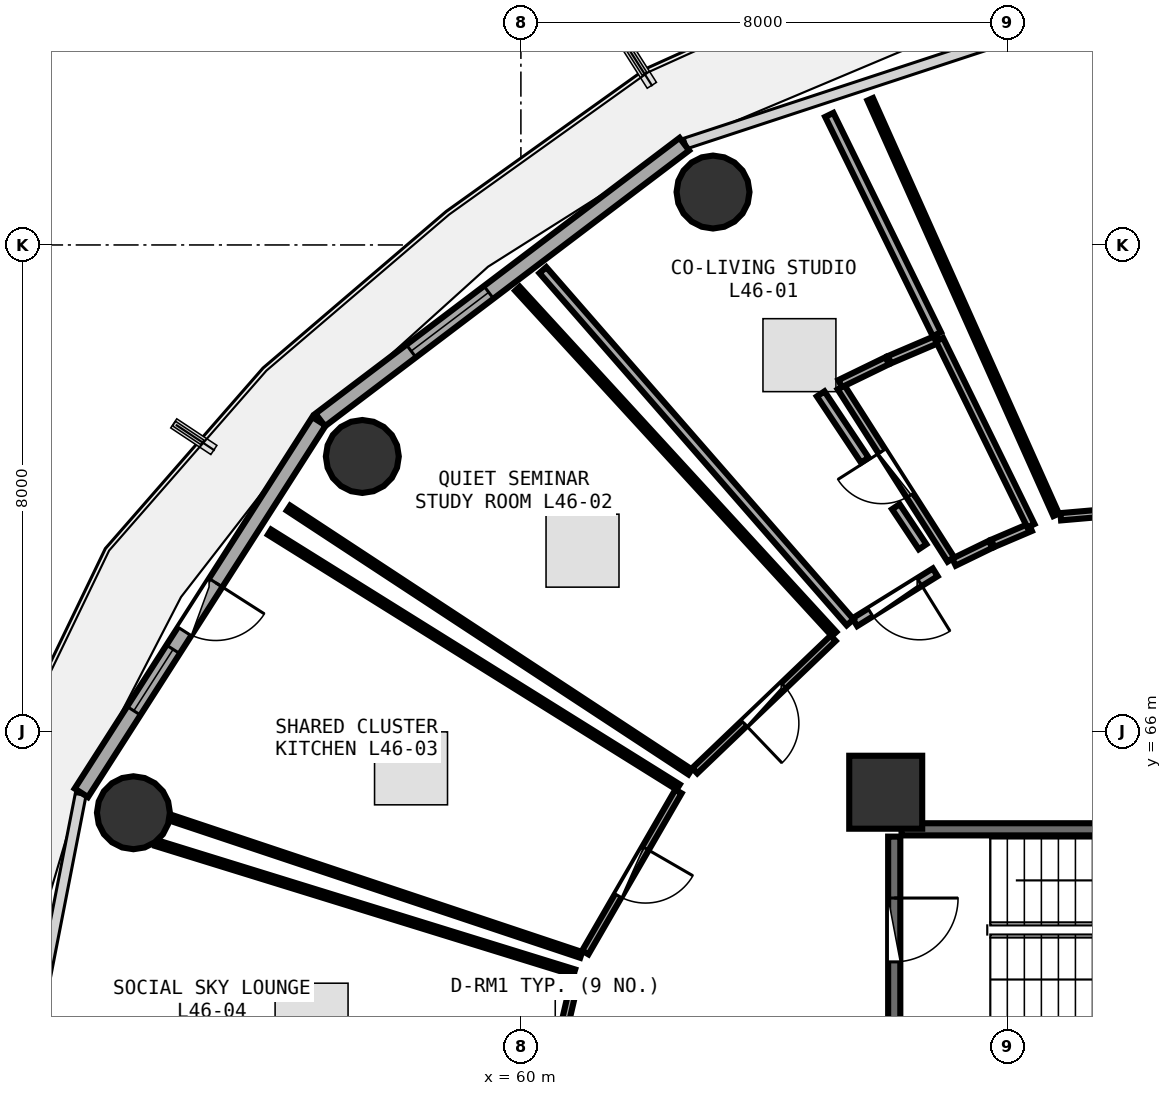
"""IFC4 building model, lengths in metres.
Left out: names, types, materials, properties, quantities, classifications, styles, units other than length and angle.
Written with IfcOpenShell. Run it as: python <this file> out.ifc"""

import sys

from ifc_helpers import new_model, si_unit, direction, frame, frame_2d, origin, origin_2d, place, context, subcontext, project, spatial, rectangle, circle, extrude, element, fill, save


model = new_model("IFC4")
c1 = context("Model", 3, precision=1e-05, world=origin(), true_north=direction((0.0, 1.0)))
c2 = subcontext(c1, "Body", "Model", "MODEL_VIEW")
j1 = project(units=[si_unit("LENGTHUNIT", "METRE"), si_unit("PLANEANGLEUNIT", "RADIAN")], contexts=[c1])
p1 = place(None, origin())
s1 = spatial("IfcSite", under=j1, at=p1, CompositionType="ELEMENT")
p2 = place(p1, origin())
s2 = spatial("IfcBuilding", under=s1, at=p2, CompositionType="ELEMENT")
p3 = place(p2, frame((0.0, 0.0, 180.6)))
s3 = spatial("IfcBuildingStorey", under=s2, at=p3, CompositionType="ELEMENT", Elevation=180.6)
p4 = place(p3, frame((66.0, 65.0, 0.0), z_axis=(0.0, 0.0, 1.0), x_axis=(1.0, 0.0, 0.0)))
e1 = element("IfcColumn", 1, at=p4, inside=s3, PredefinedType="PILASTER", context=c2, shape_type="SweptSolid", body=[
    extrude(rectangle(XDim=1.2, YDim=1.2, at=origin_2d()), origin(), (0.0, 0.0, 1.0), 3.75),
])
for number, where, z_axis, x_axis in (
    (2, (63.16, 74.87, 0.0), (0.0, 0.0, 1.0), (1.0, 0.0, 0.0)),
    (3, (57.392, 70.521, 0.0), (0.0, 0.0, 1.0), (1.0, 0.0, 0.0)),
    (4, (53.627, 64.663, 0.0), (0.0, 0.0, 1.0), (1.0, 0.0, 0.0)),
):
    element("IfcColumn", number, at=place(p3, frame(where, z_axis=z_axis, x_axis=x_axis)), inside=s3, PredefinedType="COLUMN", context=c2, shape_type="SweptSolid", body=[
        extrude(circle(Radius=0.6, at=origin_2d()), origin(), (0.0, 0.0, 1.0), 3.75),
    ])
p5 = place(p3, frame((62.688, 75.658, 0.0), z_axis=(0.0, 0.0, 1.0), x_axis=(-0.797163719609, -0.603763202042, 0.0)))
e5 = element("IfcWall", 5, at=p5, inside=s3, PredefinedType="SOLIDWALL", context=c2, shape_type="SweptSolid", body=[
    extrude(rectangle(XDim=7.512, YDim=0.26, at=frame_2d((3.756, 0.0))), origin(), (0.0, 0.0, 1.0), 3.475),
])
p6 = place(p5, frame((4.036, 0.0, 0.85)))
e6 = element("IfcOpeningElement", 6, at=p6, cuts=e5, PredefinedType="OPENING", context=c2, shape_type="SweptSolid", body=[
    extrude(rectangle(XDim=1.6, YDim=1.45, at=frame_2d((0.8, 0.725))), frame((0.0, 0.14, 0.0), z_axis=(0.0, -1.0, 0.0), x_axis=(1.0, 0.0, 0.0)), (0.0, 0.0, 1.0), 0.28),
])
p7 = place(p3, frame((56.679, 71.1, 0.0), z_axis=(0.0, 0.0, 1.0), x_axis=(-0.538801521808, -0.842432739213, 0.0)))
e7 = element("IfcWall", 7, at=p7, inside=s3, PredefinedType="SOLIDWALL", context=c2, shape_type="SweptSolid", body=[
    extrude(rectangle(XDim=7.253, YDim=0.26, at=frame_2d((3.627, 0.0))), origin(), (0.0, 0.0, 1.0), 3.475),
])
p8 = place(p7, frame((3.152, 0.0, 0.0)))
e8 = element("IfcOpeningElement", 8, at=p8, cuts=e7, PredefinedType="OPENING", context=c2, shape_type="SweptSolid", body=[
    extrude(rectangle(XDim=0.95, YDim=2.1, at=frame_2d((0.475, 1.05))), frame((0.0, 0.14, 0.0), z_axis=(0.0, -1.0, 0.0), x_axis=(1.0, 0.0, 0.0)), (0.0, 0.0, 1.0), 0.28),
])
p9 = place(p7, frame((4.452, 0.0, 0.85)))
e9 = element("IfcOpeningElement", 9, at=p9, cuts=e7, PredefinedType="OPENING", context=c2, shape_type="SweptSolid", body=[
    extrude(rectangle(XDim=1.2, YDim=1.45, at=frame_2d((0.6, 0.725))), frame((0.0, 0.14, 0.0), z_axis=(0.0, -1.0, 0.0), x_axis=(1.0, 0.0, 0.0)), (0.0, 0.0, 1.0), 0.28),
])
p10 = place(p3, frame((73.42, 64.39, 0.0), z_axis=(0.0, 0.0, 1.0), x_axis=(-1.0, 0.0, 0.0)))
e10 = element("IfcWall", 10, at=p10, inside=s3, PredefinedType="SHEAR", context=c2, shape_type="SweptSolid", body=[
    extrude(rectangle(XDim=7.16, YDim=0.2, at=frame_2d((3.58, 0.0))), origin(), (0.0, 0.0, 1.0), 3.49),
])
p11 = place(p3, frame((66.14, 64.27, 0.0), z_axis=(0.0, 0.0, 1.0), x_axis=(0.0, -1.0, 0.0)))
e11 = element("IfcWall", 11, at=p11, inside=s3, PredefinedType="SHEAR", context=c2, shape_type="SweptSolid", body=[
    extrude(rectangle(XDim=3.07, YDim=0.2, at=frame_2d((1.535, 0.0))), origin(), (0.0, 0.0, 1.0), 3.49),
])
p12 = place(p11, frame((1.01, 0.0, 0.0)))
e12 = element("IfcOpeningElement", 12, at=p12, cuts=e11, PredefinedType="OPENING", context=c2, shape_type="SweptSolid", body=[
    extrude(rectangle(XDim=1.05, YDim=2.1, at=frame_2d((0.525, 1.05))), frame((0.0, 0.11, 0.0), z_axis=(0.0, -1.0, 0.0), x_axis=(1.0, 0.0, 0.0)), (0.0, 0.0, 1.0), 0.22),
])
p13 = place(p3, frame((76.579, 70.197, 0.0), z_axis=(0.0, 0.0, 1.0), x_axis=(-0.99627488284, -0.086234319282, 0.0)))
e13 = element("IfcWall", 13, at=p13, inside=s3, PredefinedType="PARTITIONING", context=c2, shape_type="SweptSolid", body=[
    extrude(rectangle(XDim=7.729, YDim=0.12, at=frame_2d((3.865, 0.0))), origin(), (0.0, 0.0, 1.0), 2.975),
])
p14 = place(p13, frame((3.415, 0.0, 0.0)))
e14 = element("IfcOpeningElement", 14, at=p14, cuts=e13, PredefinedType="OPENING", context=c2, shape_type="SweptSolid", body=[
    extrude(rectangle(XDim=0.9, YDim=2.08, at=frame_2d((0.45, 1.04))), frame((0.0, 0.07, 0.0), z_axis=(0.0, -1.0, 0.0), x_axis=(1.0, 0.0, 0.0)), (0.0, 0.0, 1.0), 0.14),
])
p15 = place(p3, frame((67.073, 68.826, 0.0), z_axis=(0.0, 0.0, 1.0), x_axis=(-0.537814804981, 0.843063008051, 0.0)))
e15 = element("IfcWall", 15, at=p15, inside=s3, PredefinedType="PLUMBINGWALL", context=c2, shape_type="SweptSolid", body=[
    extrude(rectangle(XDim=3.362, YDim=0.13, at=frame_2d((1.681, 0.0))), origin(), (0.0, 0.0, 1.0), 3.175),
])
p16 = place(p15, frame((1.251, 0.0, 0.0)))
e16 = element("IfcOpeningElement", 16, at=p16, cuts=e15, PredefinedType="OPENING", context=c2, shape_type="SweptSolid", body=[
    extrude(rectangle(XDim=0.86, YDim=2.05, at=frame_2d((0.43, 1.025))), frame((0.0, 0.075, 0.0), z_axis=(0.0, -1.0, 0.0), x_axis=(1.0, 0.0, 0.0)), (0.0, 0.0, 1.0), 0.15),
])
p17 = place(p3, frame((66.814, 68.616, 0.0), z_axis=(0.0, 0.0, 1.0), x_axis=(-0.849572284685, -0.527472210732, 0.0)))
e17 = element("IfcWall", 17, at=p17, inside=s3, PredefinedType="PARTITIONING", context=c2, shape_type="SweptSolid", body=[
    extrude(rectangle(XDim=1.556, YDim=0.15, at=frame_2d((0.778, 0.0))), origin(), (0.0, 0.0, 1.0), 3.48),
])
p18 = place(p17, frame((0.303, 0.0, 0.0)))
e18 = element("IfcOpeningElement", 18, at=p18, cuts=e17, PredefinedType="OPENING", context=c2, shape_type="SweptSolid", body=[
    extrude(rectangle(XDim=0.95, YDim=2.08, at=frame_2d((0.475, 1.04))), frame((0.0, 0.085, 0.0), z_axis=(0.0, -1.0, 0.0), x_axis=(1.0, 0.0, 0.0)), (0.0, 0.0, 1.0), 0.17),
])
p19 = place(p3, frame((65.135, 67.531, 0.0), z_axis=(0.0, 0.0, 1.0), x_axis=(-0.722401093559, -0.691474265627, 0.0)))
e19 = element("IfcWall", 19, at=p19, inside=s3, PredefinedType="PARTITIONING", context=c2, shape_type="SweptSolid", body=[
    extrude(rectangle(XDim=3.15, YDim=0.12, at=frame_2d((1.575, 0.0))), origin(), (0.0, 0.0, 1.0), 2.975),
])
p20 = place(p19, frame((1.125, 0.0, 0.0)))
e20 = element("IfcOpeningElement", 20, at=p20, cuts=e19, PredefinedType="OPENING", context=c2, shape_type="SweptSolid", body=[
    extrude(rectangle(XDim=0.9, YDim=2.08, at=frame_2d((0.45, 1.04))), frame((0.0, 0.07, 0.0), z_axis=(0.0, -1.0, 0.0), x_axis=(1.0, 0.0, 0.0)), (0.0, 0.0, 1.0), 0.14),
])
p21 = place(p3, frame((62.591, 65.012, 0.0), z_axis=(0.0, 0.0, 1.0), x_axis=(-0.500746842293, -0.865593784598, 0.0)))
e21 = element("IfcWall", 21, at=p21, inside=s3, PredefinedType="PARTITIONING", context=c2, shape_type="SweptSolid", body=[
    extrude(rectangle(XDim=3.059, YDim=0.12, at=frame_2d((1.53, 0.0))), origin(), (0.0, 0.0, 1.0), 2.975),
])
p22 = place(p21, frame((1.08, 0.0, 0.0)))
e22 = element("IfcOpeningElement", 22, at=p22, cuts=e21, PredefinedType="OPENING", context=c2, shape_type="SweptSolid", body=[
    extrude(rectangle(XDim=0.9, YDim=2.08, at=frame_2d((0.45, 1.04))), frame((0.0, 0.07, 0.0), z_axis=(0.0, -1.0, 0.0), x_axis=(1.0, 0.0, 0.0)), (0.0, 0.0, 1.0), 0.14),
])
p23 = place(p3, frame((60.903, 61.968, 0.0), z_axis=(0.0, 0.0, 1.0), x_axis=(-0.225317744346, -0.974285335045, 0.0)))
e23 = element("IfcWall", 23, at=p23, inside=s3, PredefinedType="PARTITIONING", context=c2, shape_type="SweptSolid", body=[
    extrude(rectangle(XDim=2.996, YDim=0.12, at=frame_2d((1.498, 0.0))), origin(), (0.0, 0.0, 1.0), 3.48),
])
p24 = place(p23, frame((1.048, 0.0, 0.0)))
e24 = element("IfcOpeningElement", 24, at=p24, cuts=e23, PredefinedType="OPENING", context=c2, shape_type="SweptSolid", body=[
    extrude(rectangle(XDim=0.9, YDim=2.08, at=frame_2d((0.45, 1.04))), frame((0.0, 0.07, 0.0), z_axis=(0.0, -1.0, 0.0), x_axis=(1.0, 0.0, 0.0)), (0.0, 0.0, 1.0), 0.14),
])
p25 = place(p3, frame((68.803, 69.562, 0.0), z_axis=(0.0, 0.0, 1.0), x_axis=(-0.408373210504, 0.912815052978, 0.0)))
e25 = element("IfcWall", 25, at=p25, inside=s3, PredefinedType="PARTITIONING", context=c2, shape_type="SweptSolid", body=[
    extrude(rectangle(XDim=7.487, YDim=0.1, at=frame_2d((3.743, 0.0))), origin(), (0.0, 0.0, 1.0), 3.025),
])
p26 = place(p3, frame((68.379, 69.356, 0.0), z_axis=(0.0, 0.0, 1.0), x_axis=(-0.919951191688, -0.392032913046, 0.0)))
e26 = element("IfcWall", 26, at=p26, inside=s3, PredefinedType="PLUMBINGWALL", context=c2, shape_type="SweptSolid", body=[
    extrude(rectangle(XDim=0.672, YDim=0.13, at=frame_2d((0.336, 0.0))), origin(), (0.0, 0.0, 1.0), 3.235),
])
p27 = place(p3, frame((67.724, 69.076, 0.0), z_axis=(0.0, 0.0, 1.0), x_axis=(-0.899196253898, -0.437545537031, 0.0)))
e27 = element("IfcWall", 27, at=p27, inside=s3, PredefinedType="PLUMBINGWALL", context=c2, shape_type="SweptSolid", body=[
    extrude(rectangle(XDim=0.668, YDim=0.13, at=frame_2d((0.334, 0.0))), origin(), (0.0, 0.0, 1.0), 3.235),
])
p28 = place(p3, frame((65.25, 71.72, 0.0), z_axis=(0.0, 0.0, 1.0), x_axis=(0.899469970911, 0.43698257566, 0.0)))
e28 = element("IfcWall", 28, at=p28, inside=s3, PredefinedType="PLUMBINGWALL", context=c2, shape_type="SweptSolid", body=[
    extrude(rectangle(XDim=0.862, YDim=0.13, at=frame_2d((0.431, 0.0))), origin(), (0.0, 0.0, 1.0), 3.48),
])
p29 = place(p3, frame((66.061, 72.113, 0.0), z_axis=(0.0, 0.0, 1.0), x_axis=(0.919552803105, 0.392966464601, 0.0)))
e29 = element("IfcWall", 29, at=p29, inside=s3, PredefinedType="PLUMBINGWALL", context=c2, shape_type="SweptSolid", body=[
    extrude(rectangle(XDim=0.866, YDim=0.13, at=frame_2d((0.433, 0.0))), origin(), (0.0, 0.0, 1.0), 3.48),
])
p30 = place(p3, frame((66.885, 72.443, 0.0), z_axis=(0.0, 0.0, 1.0), x_axis=(0.440845194529, -0.897583151836, 0.0)))
e30 = element("IfcWall", 30, at=p30, inside=s3, PredefinedType="PLUMBINGWALL", context=c2, shape_type="SweptSolid", body=[
    extrude(rectangle(XDim=3.41, YDim=0.13, at=frame_2d((1.705, 0.0))), origin(), (0.0, 0.0, 1.0), 3.175),
])
p31 = place(p3, frame((65.415, 67.794, 0.0), z_axis=(0.0, 0.0, 1.0), x_axis=(-0.657449338105, 0.753498751044, 0.0)))
e31 = element("IfcWall", 31, at=p31, inside=s3, PredefinedType="PARTITIONING", context=c2, shape_type="SweptSolid", body=[
    extrude(rectangle(XDim=7.687, YDim=0.15, at=frame_2d((3.843, 0.0))), origin(), (0.0, 0.0, 1.0), 2.975),
])
p32 = place(p3, frame((65.072, 76.139, 0.0), z_axis=(0.0, 0.0, 1.0), x_axis=(0.44056455493, -0.897720932662, 0.0)))
e32 = element("IfcWall", 32, at=p32, inside=s3, PredefinedType="PARTITIONING", context=c2, shape_type="SweptSolid", body=[
    extrude(rectangle(XDim=4.017, YDim=0.15, at=frame_2d((2.009, 0.0))), origin(), (0.0, 0.0, 1.0), 3.025),
])
p33 = place(p3, frame((64.93, 71.551, 0.0), z_axis=(0.0, 0.0, 1.0), x_axis=(0.554614122057, -0.832107670686, 0.0)))
e33 = element("IfcWall", 33, at=p33, inside=s3, PredefinedType="PARTITIONING", context=c2, shape_type="SweptSolid", body=[
    extrude(rectangle(XDim=1.309, YDim=0.15, at=frame_2d((0.655, 0.0))), origin(), (0.0, 0.0, 1.0), 3.175),
])
p34 = place(p3, frame((66.167, 69.696, 0.0), z_axis=(0.0, 0.0, 1.0), x_axis=(0.554700196225, -0.832050294338, 0.0)))
e34 = element("IfcWall", 34, at=p34, inside=s3, PredefinedType="PARTITIONING", context=c2, shape_type="SweptSolid", body=[
    extrude(rectangle(XDim=0.792, YDim=0.15, at=frame_2d((0.396, 0.0))), origin(), (0.0, 0.0, 1.0), 3.235),
])
p35 = place(p3, frame((62.783, 65.334, 0.0), z_axis=(0.0, 0.0, 1.0), x_axis=(-0.835790537916, 0.549048428401, 0.0)))
e35 = element("IfcWall", 35, at=p35, inside=s3, PredefinedType="PARTITIONING", context=c2, shape_type="SweptSolid", body=[
    extrude(rectangle(XDim=7.903, YDim=0.1, at=frame_2d((3.952, 0.0))), origin(), (0.0, 0.0, 1.0), 3.025),
])
p36 = place(p3, frame((59.943, 73.281, 0.0), z_axis=(0.0, 0.0, 1.0), x_axis=(0.675932664954, -0.736963386097, 0.0)))
e36 = element("IfcWall", 36, at=p36, inside=s3, PredefinedType="PARTITIONING", context=c2, shape_type="SweptSolid", body=[
    extrude(rectangle(XDim=7.705, YDim=0.1, at=frame_2d((3.852, 0.0))), origin(), (0.0, 0.0, 1.0), 2.975),
])
p37 = place(p3, frame((60.991, 62.325, 0.0), z_axis=(0.0, 0.0, 1.0), x_axis=(-0.948483978449, 0.316825097847, 0.0)))
e37 = element("IfcWall", 37, at=p37, inside=s3, PredefinedType="PARTITIONING", context=c2, shape_type="SweptSolid", body=[
    extrude(rectangle(XDim=7.111, YDim=0.1, at=frame_2d((3.555, 0.0))), origin(), (0.0, 0.0, 1.0), 2.975),
])
p38 = place(p3, frame((55.866, 69.277, 0.0), z_axis=(0.0, 0.0, 1.0), x_axis=(0.84851390129, -0.529173090129, 0.0)))
e38 = element("IfcWall", 38, at=p38, inside=s3, PredefinedType="PARTITIONING", context=c2, shape_type="SweptSolid", body=[
    extrude(rectangle(XDim=7.921, YDim=0.1, at=frame_2d((3.96, 0.0))), origin(), (0.0, 0.0, 1.0), 2.975),
])
p39 = place(p3, frame((54.003, 64.163, 0.0), z_axis=(0.0, 0.0, 1.0), x_axis=(0.955390108929, -0.295346812679, 0.0)))
e39 = element("IfcWall", 39, at=p39, inside=s3, PredefinedType="PARTITIONING", context=c2, shape_type="SweptSolid", body=[
    extrude(rectangle(XDim=7.196, YDim=0.1, at=frame_2d((3.598, 0.0))), origin(), (0.0, 0.0, 1.0), 3.175),
])
p40 = place(p6, origin())
e40 = element("IfcWindow", 40, at=p40, inside=s3, PartitioningType="SINGLE_PANEL", PredefinedType="WINDOW", context=c2, shape_type="SweptSolid", body=[
    extrude(rectangle(XDim=1.6, YDim=1.45, at=frame_2d((0.8, 0.725))), frame((0.0, 0.03, 0.0), z_axis=(0.0, -1.0, 0.0), x_axis=(1.0, 0.0, 0.0)), (0.0, 0.0, 1.0), 0.06),
])
fill(e6, e40)
p41 = place(p8, frame((0.95, 0.0, 0.0), z_axis=(0.0, 0.0, 1.0), x_axis=(-1.0, 0.0, 0.0)))
e41 = element("IfcDoor", 41, at=p41, inside=s3, OperationType="SINGLE_SWING_RIGHT", PredefinedType="DOOR", context=c2, shape_type="SweptSolid", body=[
    extrude(rectangle(XDim=0.95, YDim=2.1, at=frame_2d((0.475, 1.05))), frame((0.0, 0.025, 0.0), z_axis=(0.0, -1.0, 0.0), x_axis=(1.0, 0.0, 0.0)), (0.0, 0.0, 1.0), 0.05),
])
fill(e8, e41)
p42 = place(p9, origin())
e42 = element("IfcWindow", 42, at=p42, inside=s3, PartitioningType="SINGLE_PANEL", PredefinedType="WINDOW", context=c2, shape_type="SweptSolid", body=[
    extrude(rectangle(XDim=1.2, YDim=1.45, at=frame_2d((0.6, 0.725))), frame((0.0, 0.03, 0.0), z_axis=(0.0, -1.0, 0.0), x_axis=(1.0, 0.0, 0.0)), (0.0, 0.0, 1.0), 0.06),
])
fill(e9, e42)
p43 = place(p12, origin())
e43 = element("IfcDoor", 43, at=p43, inside=s3, OperationType="SINGLE_SWING_LEFT", PredefinedType="DOOR", context=c2, shape_type="SweptSolid", body=[
    extrude(rectangle(XDim=1.05, YDim=2.1, at=frame_2d((0.525, 1.05))), frame((0.0, 0.025, 0.0), z_axis=(0.0, -1.0, 0.0), x_axis=(1.0, 0.0, 0.0)), (0.0, 0.0, 1.0), 0.05),
])
fill(e12, e43)
p44 = place(p16, origin())
e44 = element("IfcDoor", 44, at=p44, inside=s3, OperationType="SINGLE_SWING_RIGHT", PredefinedType="DOOR", context=c2, shape_type="SweptSolid", body=[
    extrude(rectangle(XDim=0.86, YDim=2.05, at=frame_2d((0.43, 1.025))), frame((0.0, 0.025, 0.0), z_axis=(0.0, -1.0, 0.0), x_axis=(1.0, 0.0, 0.0)), (0.0, 0.0, 1.0), 0.05),
])
fill(e16, e44)
p45 = place(p18, origin())
e45 = element("IfcDoor", 45, at=p45, inside=s3, OperationType="SINGLE_SWING_LEFT", PredefinedType="DOOR", context=c2, shape_type="SweptSolid", body=[
    extrude(rectangle(XDim=0.95, YDim=2.08, at=frame_2d((0.475, 1.04))), frame((0.0, 0.025, 0.0), z_axis=(0.0, -1.0, 0.0), x_axis=(1.0, 0.0, 0.0)), (0.0, 0.0, 1.0), 0.05),
])
fill(e18, e45)
p46 = place(p20, origin())
e46 = element("IfcDoor", 46, at=p46, inside=s3, OperationType="SINGLE_SWING_RIGHT", PredefinedType="DOOR", context=c2, shape_type="SweptSolid", body=[
    extrude(rectangle(XDim=0.9, YDim=2.08, at=frame_2d((0.45, 1.04))), frame((0.0, 0.025, 0.0), z_axis=(0.0, -1.0, 0.0), x_axis=(1.0, 0.0, 0.0)), (0.0, 0.0, 1.0), 0.05),
])
fill(e20, e46)
p47 = place(p22, origin())
e47 = element("IfcDoor", 47, at=p47, inside=s3, OperationType="SINGLE_SWING_LEFT", PredefinedType="DOOR", context=c2, shape_type="SweptSolid", body=[
    extrude(rectangle(XDim=0.9, YDim=2.08, at=frame_2d((0.45, 1.04))), frame((0.0, 0.025, 0.0), z_axis=(0.0, -1.0, 0.0), x_axis=(1.0, 0.0, 0.0)), (0.0, 0.0, 1.0), 0.05),
])
fill(e22, e47)
save(model, sys.argv[1])
